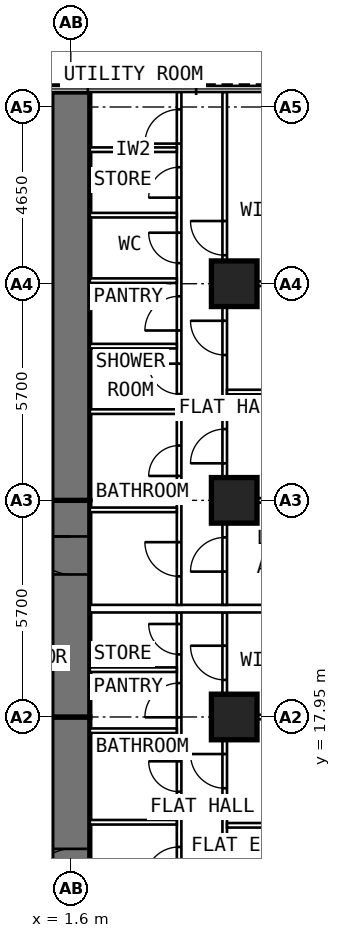
"""IFC4 building model, lengths in metres.
Left out: names, types, materials, properties, quantities, classifications, styles, units other than length and angle.
Written with IfcOpenShell. Run it as: python <this file> out.ifc"""

import sys

from ifc_helpers import new_model, si_unit, direction, frame, frame_2d, origin, origin_2d, place, context, subcontext, project, spatial, rectangle, extrude, element, fill, save


model = new_model("IFC4")
c1 = context("Model", 3, precision=1e-05, world=origin(), true_north=direction((0.0, 1.0)))
c2 = subcontext(c1, "Body", "Model", "MODEL_VIEW")
j1 = project(units=[si_unit("LENGTHUNIT", "METRE"), si_unit("PLANEANGLEUNIT", "RADIAN")], contexts=[c1])
p1 = place(None, origin())
s1 = spatial("IfcSite", under=j1, at=p1, CompositionType="ELEMENT")
p2 = place(p1, origin())
s2 = spatial("IfcBuilding", under=s1, at=p2, CompositionType="ELEMENT")
p3 = place(p2, frame((0.0, 0.0, 84.4)))
s3 = spatial("IfcBuildingStorey", under=s2, at=p3, CompositionType="ELEMENT", Elevation=84.4)
for number, where, z_axis, x_axis in (
    (1, (5.9, 17.95, 0.0), (0.0, 0.0, 1.0), (0.0, 1.0, 0.0)),
    (2, (5.9, 23.65, 0.0), (0.0, 0.0, 1.0), (0.0, 1.0, 0.0)),
    (3, (5.9, 29.35, 0.0), (0.0, 0.0, 1.0), (0.0, 1.0, 0.0)),
):
    element("IfcColumn", number, at=place(p3, frame(where, z_axis=z_axis, x_axis=x_axis)), inside=s3, PredefinedType="COLUMN", context=c2, shape_type="SweptSolid", body=[
        extrude(rectangle(XDim=1.2, YDim=1.2, at=origin_2d()), origin(), (0.0, 0.0, 1.0), 3.6),
    ])
p4 = place(p3, frame((1.6, 9.6, 0.0), z_axis=(0.0, 0.0, 1.0), x_axis=(0.0, 1.0, 0.0)))
e4 = element("IfcWall", 4, at=p4, inside=s3, PredefinedType="SHEAR", context=c2, shape_type="SweptSolid", body=[
    extrude(rectangle(XDim=8.35, YDim=1.0, at=frame_2d((4.175, 0.0))), origin(), (0.0, 0.0, 1.0), 3.6),
])
p5 = place(p4, frame((3.88, 0.0, 0.0)))
e5 = element("IfcOpeningElement", 5, at=p5, cuts=e4, PredefinedType="OPENING", context=c2, shape_type="SweptSolid", body=[
    extrude(rectangle(XDim=1.0, YDim=2.1, at=frame_2d((0.5, 1.05))), frame((0.0, 0.512, 0.0), z_axis=(0.0, -1.0, 0.0), x_axis=(1.0, 0.0, 0.0)), (0.0, 0.0, 1.0), 1.024),
])
p6 = place(p3, frame((1.6, 17.95, 0.0), z_axis=(0.0, 0.0, 1.0), x_axis=(0.0, 1.0, 0.0)))
e6 = element("IfcWall", 6, at=p6, inside=s3, PredefinedType="SHEAR", context=c2, shape_type="SweptSolid", body=[
    extrude(rectangle(XDim=5.7, YDim=1.0, at=frame_2d((2.85, 0.0))), origin(), (0.0, 0.0, 1.0), 3.6),
])
p7 = place(p6, frame((3.75, 0.0, 0.0)))
e7 = element("IfcOpeningElement", 7, at=p7, cuts=e6, PredefinedType="OPENING", context=c2, shape_type="SweptSolid", body=[
    extrude(rectangle(XDim=1.0, YDim=2.1, at=frame_2d((0.5, 1.05))), frame((0.0, 0.512, 0.0), z_axis=(0.0, -1.0, 0.0), x_axis=(1.0, 0.0, 0.0)), (0.0, 0.0, 1.0), 1.024),
])
p8 = place(p3, frame((1.6, 23.65, 0.0), z_axis=(0.0, 0.0, 1.0), x_axis=(0.0, 1.0, 0.0)))
e8 = element("IfcWall", 8, at=p8, inside=s3, PredefinedType="SHEAR", context=c2, shape_type="SweptSolid", body=[
    extrude(rectangle(XDim=10.745, YDim=1.0, at=frame_2d((5.373, 0.0))), origin(), (0.0, 0.0, 1.0), 3.6),
])
p9 = place(p3, frame((4.45, 10.1, 0.0), z_axis=(0.0, 0.0, 1.0), x_axis=(0.0, 1.0, 0.0)))
e9 = element("IfcWall", 9, at=p9, inside=s3, PredefinedType="PARTITIONING", context=c2, shape_type="SweptSolid", body=[
    extrude(rectangle(XDim=10.6, YDim=0.12, at=frame_2d((5.3, 0.0))), origin(), (0.0, 0.0, 1.0), 3.35),
])
p10 = place(p9, frame((1.59, 0.0, 0.0)))
e10 = element("IfcOpeningElement", 10, at=p10, cuts=e9, PredefinedType="OPENING", context=c2, shape_type="SweptSolid", body=[
    extrude(rectangle(XDim=0.8, YDim=2.1, at=frame_2d((0.4, 1.05))), frame((0.0, 0.072, 0.0), z_axis=(0.0, -1.0, 0.0), x_axis=(1.0, 0.0, 0.0)), (0.0, 0.0, 1.0), 0.144),
])
p11 = place(p9, frame((3.53, 0.0, 0.0)))
e11 = element("IfcOpeningElement", 11, at=p11, cuts=e9, PredefinedType="OPENING", context=c2, shape_type="SweptSolid", body=[
    extrude(rectangle(XDim=0.9, YDim=2.1, at=frame_2d((0.45, 1.05))), frame((0.0, 0.072, 0.0), z_axis=(0.0, -1.0, 0.0), x_axis=(1.0, 0.0, 0.0)), (0.0, 0.0, 1.0), 0.144),
])
p12 = place(p9, frame((5.884, 0.0, 0.0)))
e12 = element("IfcOpeningElement", 12, at=p12, cuts=e9, PredefinedType="OPENING", context=c2, shape_type="SweptSolid", body=[
    extrude(rectangle(XDim=0.8, YDim=2.1, at=frame_2d((0.4, 1.05))), frame((0.0, 0.072, 0.0), z_axis=(0.0, -1.0, 0.0), x_axis=(1.0, 0.0, 0.0)), (0.0, 0.0, 1.0), 0.144),
])
p13 = place(p9, frame((7.842, 0.0, 0.0)))
e13 = element("IfcOpeningElement", 13, at=p13, cuts=e9, PredefinedType="OPENING", context=c2, shape_type="SweptSolid", body=[
    extrude(rectangle(XDim=0.9, YDim=2.1, at=frame_2d((0.45, 1.05))), frame((0.0, 0.072, 0.0), z_axis=(0.0, -1.0, 0.0), x_axis=(1.0, 0.0, 0.0)), (0.0, 0.0, 1.0), 0.144),
])
p14 = place(p9, frame((9.497, 0.0, 0.0)))
e14 = element("IfcOpeningElement", 14, at=p14, cuts=e9, PredefinedType="OPENING", context=c2, shape_type="SweptSolid", body=[
    extrude(rectangle(XDim=0.8, YDim=2.1, at=frame_2d((0.4, 1.05))), frame((0.0, 0.072, 0.0), z_axis=(0.0, -1.0, 0.0), x_axis=(1.0, 0.0, 0.0)), (0.0, 0.0, 1.0), 0.144),
])
p15 = place(p3, frame((5.65, 9.6, 0.0), z_axis=(0.0, 0.0, 1.0), x_axis=(0.0, 1.0, 0.0)))
e15 = element("IfcWall", 15, at=p15, inside=s3, PredefinedType="PARTITIONING", context=c2, shape_type="SweptSolid", body=[
    extrude(rectangle(XDim=11.1, YDim=0.12, at=frame_2d((5.55, 0.0))), origin(), (0.0, 0.0, 1.0), 3.35),
])
p16 = place(p15, frame((1.0, 0.0, 0.0)))
e16 = element("IfcOpeningElement", 16, at=p16, cuts=e15, PredefinedType="OPENING", context=c2, shape_type="SweptSolid", body=[
    extrude(rectangle(XDim=0.9, YDim=2.1, at=frame_2d((0.45, 1.05))), frame((0.0, 0.072, 0.0), z_axis=(0.0, -1.0, 0.0), x_axis=(1.0, 0.0, 0.0)), (0.0, 0.0, 1.0), 0.144),
])
p17 = place(p15, frame((3.625, 0.0, 0.0)))
e17 = element("IfcOpeningElement", 17, at=p17, cuts=e15, PredefinedType="OPENING", context=c2, shape_type="SweptSolid", body=[
    extrude(rectangle(XDim=0.9, YDim=2.1, at=frame_2d((0.45, 1.05))), frame((0.0, 0.072, 0.0), z_axis=(0.0, -1.0, 0.0), x_axis=(1.0, 0.0, 0.0)), (0.0, 0.0, 1.0), 0.144),
])
p18 = place(p15, frame((6.475, 0.0, 0.0)))
e18 = element("IfcOpeningElement", 18, at=p18, cuts=e15, PredefinedType="OPENING", context=c2, shape_type="SweptSolid", body=[
    extrude(rectangle(XDim=0.9, YDim=2.1, at=frame_2d((0.45, 1.05))), frame((0.0, 0.072, 0.0), z_axis=(0.0, -1.0, 0.0), x_axis=(1.0, 0.0, 0.0)), (0.0, 0.0, 1.0), 0.144),
])
p19 = place(p15, frame((9.325, 0.0, 0.0)))
e19 = element("IfcOpeningElement", 19, at=p19, cuts=e15, PredefinedType="OPENING", context=c2, shape_type="SweptSolid", body=[
    extrude(rectangle(XDim=0.9, YDim=2.1, at=frame_2d((0.45, 1.05))), frame((0.0, 0.072, 0.0), z_axis=(0.0, -1.0, 0.0), x_axis=(1.0, 0.0, 0.0)), (0.0, 0.0, 1.0), 0.144),
])
p20 = place(p3, frame((5.71, 15.1, 0.0), z_axis=(0.0, 0.0, 1.0), x_axis=(1.0, 0.0, 0.0)))
e20 = element("IfcWall", 20, at=p20, inside=s3, PredefinedType="PARTITIONING", context=c2, shape_type="SweptSolid", body=[
    extrude(rectangle(XDim=4.99, YDim=0.12, at=frame_2d((2.495, 0.0))), origin(), (0.0, 0.0, 1.0), 3.35),
])
p21 = place(p3, frame((5.71, 17.95, 0.0), z_axis=(0.0, 0.0, 1.0), x_axis=(1.0, 0.0, 0.0)))
e21 = element("IfcWall", 21, at=p21, inside=s3, PredefinedType="PARTITIONING", context=c2, shape_type="SweptSolid", body=[
    extrude(rectangle(XDim=4.99, YDim=0.12, at=frame_2d((2.495, 0.0))), origin(), (0.0, 0.0, 1.0), 2.45),
])
p22 = place(p3, frame((2.1, 15.18, 0.0), z_axis=(0.0, 0.0, 1.0), x_axis=(1.0, 0.0, 0.0)))
e22 = element("IfcWall", 22, at=p22, inside=s3, PredefinedType="PARTITIONING", context=c2, shape_type="SweptSolid", body=[
    extrude(rectangle(XDim=2.29, YDim=0.12, at=frame_2d((1.145, 0.0))), origin(), (0.0, 0.0, 1.0), 3.35),
])
p23 = place(p3, frame((2.1, 17.589, 0.0), z_axis=(0.0, 0.0, 1.0), x_axis=(1.0, 0.0, 0.0)))
e23 = element("IfcWall", 23, at=p23, inside=s3, PredefinedType="PARTITIONING", context=c2, shape_type="SweptSolid", body=[
    extrude(rectangle(XDim=2.29, YDim=0.12, at=frame_2d((1.145, 0.0))), origin(), (0.0, 0.0, 1.0), 2.45),
])
p24 = place(p3, frame((2.1, 19.194, 0.0), z_axis=(0.0, 0.0, 1.0), x_axis=(1.0, 0.0, 0.0)))
e24 = element("IfcWall", 24, at=p24, inside=s3, PredefinedType="PARTITIONING", context=c2, shape_type="SweptSolid", body=[
    extrude(rectangle(XDim=2.29, YDim=0.12, at=frame_2d((1.145, 0.0))), origin(), (0.0, 0.0, 1.0), 3.35),
])
p25 = place(p3, frame((4.45, 20.9, 0.0), z_axis=(0.0, 0.0, 1.0), x_axis=(0.0, 1.0, 0.0)))
e25 = element("IfcWall", 25, at=p25, inside=s3, PredefinedType="PARTITIONING", context=c2, shape_type="SweptSolid", body=[
    extrude(rectangle(XDim=13.495, YDim=0.12, at=frame_2d((6.748, 0.0))), origin(), (0.0, 0.0, 1.0), 3.35),
])
p26 = place(p25, frame((0.75, 0.0, 0.0)))
e26 = element("IfcOpeningElement", 26, at=p26, cuts=e25, PredefinedType="OPENING", context=c2, shape_type="SweptSolid", body=[
    extrude(rectangle(XDim=0.9, YDim=2.1, at=frame_2d((0.45, 1.05))), frame((0.0, 0.072, 0.0), z_axis=(0.0, -1.0, 0.0), x_axis=(1.0, 0.0, 0.0)), (0.0, 0.0, 1.0), 0.144),
])
p27 = place(p25, frame((3.392, 0.0, 0.0)))
e27 = element("IfcOpeningElement", 27, at=p27, cuts=e25, PredefinedType="OPENING", context=c2, shape_type="SweptSolid", body=[
    extrude(rectangle(XDim=0.8, YDim=2.1, at=frame_2d((0.4, 1.05))), frame((0.0, 0.072, 0.0), z_axis=(0.0, -1.0, 0.0), x_axis=(1.0, 0.0, 0.0)), (0.0, 0.0, 1.0), 0.144),
])
p28 = place(p25, frame((5.546, 0.0, 0.0)))
e28 = element("IfcOpeningElement", 28, at=p28, cuts=e25, PredefinedType="OPENING", context=c2, shape_type="SweptSolid", body=[
    extrude(rectangle(XDim=0.8, YDim=2.1, at=frame_2d((0.4, 1.05))), frame((0.0, 0.072, 0.0), z_axis=(0.0, -1.0, 0.0), x_axis=(1.0, 0.0, 0.0)), (0.0, 0.0, 1.0), 0.144),
])
p29 = place(p25, frame((7.219, 0.0, 0.0)))
e29 = element("IfcOpeningElement", 29, at=p29, cuts=e25, PredefinedType="OPENING", context=c2, shape_type="SweptSolid", body=[
    extrude(rectangle(XDim=0.9, YDim=2.1, at=frame_2d((0.45, 1.05))), frame((0.0, 0.072, 0.0), z_axis=(0.0, -1.0, 0.0), x_axis=(1.0, 0.0, 0.0)), (0.0, 0.0, 1.0), 0.144),
])
p30 = place(p25, frame((8.992, 0.0, 0.0)))
e30 = element("IfcOpeningElement", 30, at=p30, cuts=e25, PredefinedType="OPENING", context=c2, shape_type="SweptSolid", body=[
    extrude(rectangle(XDim=0.8, YDim=2.1, at=frame_2d((0.4, 1.05))), frame((0.0, 0.072, 0.0), z_axis=(0.0, -1.0, 0.0), x_axis=(1.0, 0.0, 0.0)), (0.0, 0.0, 1.0), 0.144),
])
p31 = place(p25, frame((10.715, 0.0, 0.0)))
e31 = element("IfcOpeningElement", 31, at=p31, cuts=e25, PredefinedType="OPENING", context=c2, shape_type="SweptSolid", body=[
    extrude(rectangle(XDim=0.8, YDim=2.1, at=frame_2d((0.4, 1.05))), frame((0.0, 0.072, 0.0), z_axis=(0.0, -1.0, 0.0), x_axis=(1.0, 0.0, 0.0)), (0.0, 0.0, 1.0), 0.144),
])
p32 = place(p25, frame((12.137, 0.0, 0.0)))
e32 = element("IfcOpeningElement", 32, at=p32, cuts=e25, PredefinedType="OPENING", context=c2, shape_type="SweptSolid", body=[
    extrude(rectangle(XDim=0.9, YDim=2.1, at=frame_2d((0.45, 1.05))), frame((0.0, 0.072, 0.0), z_axis=(0.0, -1.0, 0.0), x_axis=(1.0, 0.0, 0.0)), (0.0, 0.0, 1.0), 0.144),
])
p33 = place(p3, frame((5.65, 20.9, 0.0), z_axis=(0.0, 0.0, 1.0), x_axis=(0.0, 1.0, 0.0)))
e33 = element("IfcWall", 33, at=p33, inside=s3, PredefinedType="PARTITIONING", context=c2, shape_type="SweptSolid", body=[
    extrude(rectangle(XDim=13.495, YDim=0.12, at=frame_2d((6.748, 0.0))), origin(), (0.0, 0.0, 1.0), 3.35),
])
p34 = place(p33, frame((0.875, 0.0, 0.0)))
e34 = element("IfcOpeningElement", 34, at=p34, cuts=e33, PredefinedType="OPENING", context=c2, shape_type="SweptSolid", body=[
    extrude(rectangle(XDim=0.9, YDim=2.1, at=frame_2d((0.45, 1.05))), frame((0.0, 0.072, 0.0), z_axis=(0.0, -1.0, 0.0), x_axis=(1.0, 0.0, 0.0)), (0.0, 0.0, 1.0), 0.144),
])
p35 = place(p33, frame((3.725, 0.0, 0.0)))
e35 = element("IfcOpeningElement", 35, at=p35, cuts=e33, PredefinedType="OPENING", context=c2, shape_type="SweptSolid", body=[
    extrude(rectangle(XDim=0.9, YDim=2.1, at=frame_2d((0.45, 1.05))), frame((0.0, 0.072, 0.0), z_axis=(0.0, -1.0, 0.0), x_axis=(1.0, 0.0, 0.0)), (0.0, 0.0, 1.0), 0.144),
])
p36 = place(p33, frame((6.575, 0.0, 0.0)))
e36 = element("IfcOpeningElement", 36, at=p36, cuts=e33, PredefinedType="OPENING", context=c2, shape_type="SweptSolid", body=[
    extrude(rectangle(XDim=0.9, YDim=2.1, at=frame_2d((0.45, 1.05))), frame((0.0, 0.072, 0.0), z_axis=(0.0, -1.0, 0.0), x_axis=(1.0, 0.0, 0.0)), (0.0, 0.0, 1.0), 0.144),
])
p37 = place(p33, frame((9.2, 0.0, 0.0)))
e37 = element("IfcOpeningElement", 37, at=p37, cuts=e33, PredefinedType="OPENING", context=c2, shape_type="SweptSolid", body=[
    extrude(rectangle(XDim=0.9, YDim=2.1, at=frame_2d((0.45, 1.05))), frame((0.0, 0.072, 0.0), z_axis=(0.0, -1.0, 0.0), x_axis=(1.0, 0.0, 0.0)), (0.0, 0.0, 1.0), 0.144),
])
p38 = place(p3, frame((5.71, 23.65, 0.0), z_axis=(0.0, 0.0, 1.0), x_axis=(1.0, 0.0, 0.0)))
e38 = element("IfcWall", 38, at=p38, inside=s3, PredefinedType="PARTITIONING", context=c2, shape_type="SweptSolid", body=[
    extrude(rectangle(XDim=4.99, YDim=0.12, at=frame_2d((2.495, 0.0))), origin(), (0.0, 0.0, 1.0), 2.45),
])
p39 = place(p3, frame((5.71, 26.5, 0.0), z_axis=(0.0, 0.0, 1.0), x_axis=(1.0, 0.0, 0.0)))
e39 = element("IfcWall", 39, at=p39, inside=s3, PredefinedType="PARTITIONING", context=c2, shape_type="SweptSolid", body=[
    extrude(rectangle(XDim=4.99, YDim=0.12, at=frame_2d((2.495, 0.0))), origin(), (0.0, 0.0, 1.0), 3.35),
])
p40 = place(p3, frame((5.71, 29.35, 0.0), z_axis=(0.0, 0.0, 1.0), x_axis=(1.0, 0.0, 0.0)))
e40 = element("IfcWall", 40, at=p40, inside=s3, PredefinedType="PARTITIONING", context=c2, shape_type="SweptSolid", body=[
    extrude(rectangle(XDim=4.99, YDim=0.12, at=frame_2d((2.495, 0.0))), origin(), (0.0, 0.0, 1.0), 2.45),
])
p41 = place(p3, frame((2.1, 23.4, 0.0), z_axis=(0.0, 0.0, 1.0), x_axis=(1.0, 0.0, 0.0)))
e41 = element("IfcWall", 41, at=p41, inside=s3, PredefinedType="PARTITIONING", context=c2, shape_type="SweptSolid", body=[
    extrude(rectangle(XDim=2.29, YDim=0.12, at=frame_2d((1.145, 0.0))), origin(), (0.0, 0.0, 1.0), 2.45),
])
for number, where, z_axis, x_axis in (
    (42, (2.1, 25.985, 0.0), (0.0, 0.0, 1.0), (1.0, 0.0, 0.0)),
    (43, (2.1, 27.708, 0.0), (0.0, 0.0, 1.0), (1.0, 0.0, 0.0)),
):
    element("IfcWall", number, at=place(p3, frame(where, z_axis=z_axis, x_axis=x_axis)), inside=s3, PredefinedType="PARTITIONING", context=c2, shape_type="SweptSolid", body=[
        extrude(rectangle(XDim=2.29, YDim=0.12, at=frame_2d((1.145, 0.0))), origin(), (0.0, 0.0, 1.0), 3.35),
    ])
p42 = place(p3, frame((2.1, 29.431, 0.0), z_axis=(0.0, 0.0, 1.0), x_axis=(1.0, 0.0, 0.0)))
e44 = element("IfcWall", 44, at=p42, inside=s3, PredefinedType="PARTITIONING", context=c2, shape_type="SweptSolid", body=[
    extrude(rectangle(XDim=2.29, YDim=0.12, at=frame_2d((1.145, 0.0))), origin(), (0.0, 0.0, 1.0), 2.45),
])
for number, where, z_axis, x_axis in (
    (45, (2.1, 31.154, 0.0), (0.0, 0.0, 1.0), (1.0, 0.0, 0.0)),
    (46, (2.1, 32.877, 0.0), (0.0, 0.0, 1.0), (1.0, 0.0, 0.0)),
):
    element("IfcWall", number, at=place(p3, frame(where, z_axis=z_axis, x_axis=x_axis)), inside=s3, PredefinedType="PARTITIONING", context=c2, shape_type="SweptSolid", body=[
        extrude(rectangle(XDim=2.29, YDim=0.12, at=frame_2d((1.145, 0.0))), origin(), (0.0, 0.0, 1.0), 3.35),
    ])
p43 = place(p3, frame((2.1, 20.8, 0.0), z_axis=(0.0, 0.0, 1.0), x_axis=(1.0, 0.0, 0.0)))
e47 = element("IfcWall", 47, at=p43, inside=s3, PredefinedType="PARTITIONING", context=c2, shape_type="SweptSolid", body=[
    extrude(rectangle(XDim=8.6, YDim=0.2, at=frame_2d((4.3, 0.0))), origin(), (0.0, 0.0, 1.0), 3.35),
])
p44 = place(p5, origin())
e48 = element("IfcDoor", 48, at=p44, inside=s3, OperationType="SINGLE_SWING_LEFT", PredefinedType="DOOR", context=c2, shape_type="SweptSolid", body=[
    extrude(rectangle(XDim=1.0, YDim=2.1, at=frame_2d((0.5, 1.05))), frame((0.0, 0.25, 0.0), z_axis=(0.0, -1.0, 0.0), x_axis=(1.0, 0.0, 0.0)), (0.0, 0.0, 1.0), 0.5),
])
fill(e5, e48)
p45 = place(p18, origin())
e49 = element("IfcDoor", 49, at=p45, inside=s3, OperationType="SINGLE_SWING_RIGHT", PredefinedType="DOOR", context=c2, shape_type="SweptSolid", body=[
    extrude(rectangle(XDim=0.9, YDim=2.1, at=frame_2d((0.45, 1.05))), frame((0.0, 0.025, 0.0), z_axis=(0.0, -1.0, 0.0), x_axis=(1.0, 0.0, 0.0)), (0.0, 0.0, 1.0), 0.05),
])
fill(e18, e49)
p46 = place(p19, origin())
e50 = element("IfcDoor", 50, at=p46, inside=s3, OperationType="SINGLE_SWING_RIGHT", PredefinedType="DOOR", context=c2, shape_type="SweptSolid", body=[
    extrude(rectangle(XDim=0.9, YDim=2.1, at=frame_2d((0.45, 1.05))), frame((0.0, 0.025, 0.0), z_axis=(0.0, -1.0, 0.0), x_axis=(1.0, 0.0, 0.0)), (0.0, 0.0, 1.0), 0.05),
])
fill(e19, e50)
p47 = place(p11, origin())
e51 = element("IfcDoor", 51, at=p47, inside=s3, OperationType="SINGLE_SWING_LEFT", PredefinedType="DOOR", context=c2, shape_type="SweptSolid", body=[
    extrude(rectangle(XDim=0.9, YDim=2.1, at=frame_2d((0.45, 1.05))), frame((0.0, 0.025, 0.0), z_axis=(0.0, -1.0, 0.0), x_axis=(1.0, 0.0, 0.0)), (0.0, 0.0, 1.0), 0.05),
])
fill(e11, e51)
p48 = place(p12, origin())
e52 = element("IfcDoor", 52, at=p48, inside=s3, OperationType="SINGLE_SWING_RIGHT", PredefinedType="DOOR", context=c2, shape_type="SweptSolid", body=[
    extrude(rectangle(XDim=0.8, YDim=2.1, at=frame_2d((0.4, 1.05))), frame((0.0, 0.025, 0.0), z_axis=(0.0, -1.0, 0.0), x_axis=(1.0, 0.0, 0.0)), (0.0, 0.0, 1.0), 0.05),
])
fill(e12, e52)
p49 = place(p13, origin())
e53 = element("IfcDoor", 53, at=p49, inside=s3, OperationType="SINGLE_SWING_LEFT", PredefinedType="DOOR", context=c2, shape_type="SweptSolid", body=[
    extrude(rectangle(XDim=0.9, YDim=2.1, at=frame_2d((0.45, 1.05))), frame((0.0, 0.025, 0.0), z_axis=(0.0, -1.0, 0.0), x_axis=(1.0, 0.0, 0.0)), (0.0, 0.0, 1.0), 0.05),
])
fill(e13, e53)
p50 = place(p14, origin())
e54 = element("IfcDoor", 54, at=p50, inside=s3, OperationType="SINGLE_SWING_RIGHT", PredefinedType="DOOR", context=c2, shape_type="SweptSolid", body=[
    extrude(rectangle(XDim=0.8, YDim=2.1, at=frame_2d((0.4, 1.05))), frame((0.0, 0.025, 0.0), z_axis=(0.0, -1.0, 0.0), x_axis=(1.0, 0.0, 0.0)), (0.0, 0.0, 1.0), 0.05),
])
fill(e14, e54)
p51 = place(p7, origin())
e55 = element("IfcDoor", 55, at=p51, inside=s3, OperationType="SINGLE_SWING_RIGHT", PredefinedType="DOOR", context=c2, shape_type="SweptSolid", body=[
    extrude(rectangle(XDim=1.0, YDim=2.1, at=frame_2d((0.5, 1.05))), frame((0.0, 0.25, 0.0), z_axis=(0.0, -1.0, 0.0), x_axis=(1.0, 0.0, 0.0)), (0.0, 0.0, 1.0), 0.5),
])
fill(e7, e55)
p52 = place(p34, origin())
e56 = element("IfcDoor", 56, at=p52, inside=s3, OperationType="SINGLE_SWING_LEFT", PredefinedType="DOOR", context=c2, shape_type="SweptSolid", body=[
    extrude(rectangle(XDim=0.9, YDim=2.1, at=frame_2d((0.45, 1.05))), frame((0.0, 0.025, 0.0), z_axis=(0.0, -1.0, 0.0), x_axis=(1.0, 0.0, 0.0)), (0.0, 0.0, 1.0), 0.05),
])
fill(e34, e56)
p53 = place(p35, origin())
e57 = element("IfcDoor", 57, at=p53, inside=s3, OperationType="SINGLE_SWING_LEFT", PredefinedType="DOOR", context=c2, shape_type="SweptSolid", body=[
    extrude(rectangle(XDim=0.9, YDim=2.1, at=frame_2d((0.45, 1.05))), frame((0.0, 0.025, 0.0), z_axis=(0.0, -1.0, 0.0), x_axis=(1.0, 0.0, 0.0)), (0.0, 0.0, 1.0), 0.05),
])
fill(e35, e57)
p54 = place(p36, origin())
e58 = element("IfcDoor", 58, at=p54, inside=s3, OperationType="SINGLE_SWING_RIGHT", PredefinedType="DOOR", context=c2, shape_type="SweptSolid", body=[
    extrude(rectangle(XDim=0.9, YDim=2.1, at=frame_2d((0.45, 1.05))), frame((0.0, 0.025, 0.0), z_axis=(0.0, -1.0, 0.0), x_axis=(1.0, 0.0, 0.0)), (0.0, 0.0, 1.0), 0.05),
])
fill(e36, e58)
p55 = place(p37, origin())
e59 = element("IfcDoor", 59, at=p55, inside=s3, OperationType="SINGLE_SWING_RIGHT", PredefinedType="DOOR", context=c2, shape_type="SweptSolid", body=[
    extrude(rectangle(XDim=0.9, YDim=2.1, at=frame_2d((0.45, 1.05))), frame((0.0, 0.025, 0.0), z_axis=(0.0, -1.0, 0.0), x_axis=(1.0, 0.0, 0.0)), (0.0, 0.0, 1.0), 0.05),
])
fill(e37, e59)
p56 = place(p26, origin())
e60 = element("IfcDoor", 60, at=p56, inside=s3, OperationType="SINGLE_SWING_RIGHT", PredefinedType="DOOR", context=c2, shape_type="SweptSolid", body=[
    extrude(rectangle(XDim=0.9, YDim=2.1, at=frame_2d((0.45, 1.05))), frame((0.0, 0.025, 0.0), z_axis=(0.0, -1.0, 0.0), x_axis=(1.0, 0.0, 0.0)), (0.0, 0.0, 1.0), 0.05),
])
fill(e26, e60)
p57 = place(p27, origin())
e61 = element("IfcDoor", 61, at=p57, inside=s3, OperationType="SINGLE_SWING_LEFT", PredefinedType="DOOR", context=c2, shape_type="SweptSolid", body=[
    extrude(rectangle(XDim=0.8, YDim=2.1, at=frame_2d((0.4, 1.05))), frame((0.0, 0.025, 0.0), z_axis=(0.0, -1.0, 0.0), x_axis=(1.0, 0.0, 0.0)), (0.0, 0.0, 1.0), 0.05),
])
fill(e27, e61)
p58 = place(p28, origin())
e62 = element("IfcDoor", 62, at=p58, inside=s3, OperationType="SINGLE_SWING_RIGHT", PredefinedType="DOOR", context=c2, shape_type="SweptSolid", body=[
    extrude(rectangle(XDim=0.8, YDim=2.1, at=frame_2d((0.4, 1.05))), frame((0.0, 0.025, 0.0), z_axis=(0.0, -1.0, 0.0), x_axis=(1.0, 0.0, 0.0)), (0.0, 0.0, 1.0), 0.05),
])
fill(e28, e62)
p59 = place(p29, origin())
e63 = element("IfcDoor", 63, at=p59, inside=s3, OperationType="SINGLE_SWING_LEFT", PredefinedType="DOOR", context=c2, shape_type="SweptSolid", body=[
    extrude(rectangle(XDim=0.9, YDim=2.1, at=frame_2d((0.45, 1.05))), frame((0.0, 0.025, 0.0), z_axis=(0.0, -1.0, 0.0), x_axis=(1.0, 0.0, 0.0)), (0.0, 0.0, 1.0), 0.05),
])
fill(e29, e63)
p60 = place(p30, origin())
e64 = element("IfcDoor", 64, at=p60, inside=s3, OperationType="SINGLE_SWING_RIGHT", PredefinedType="DOOR", context=c2, shape_type="SweptSolid", body=[
    extrude(rectangle(XDim=0.8, YDim=2.1, at=frame_2d((0.4, 1.05))), frame((0.0, 0.025, 0.0), z_axis=(0.0, -1.0, 0.0), x_axis=(1.0, 0.0, 0.0)), (0.0, 0.0, 1.0), 0.05),
])
fill(e30, e64)
p61 = place(p31, origin())
e65 = element("IfcDoor", 65, at=p61, inside=s3, OperationType="SINGLE_SWING_LEFT", PredefinedType="DOOR", context=c2, shape_type="SweptSolid", body=[
    extrude(rectangle(XDim=0.8, YDim=2.1, at=frame_2d((0.4, 1.05))), frame((0.0, 0.025, 0.0), z_axis=(0.0, -1.0, 0.0), x_axis=(1.0, 0.0, 0.0)), (0.0, 0.0, 1.0), 0.05),
])
fill(e31, e65)
p62 = place(p32, origin())
e66 = element("IfcDoor", 66, at=p62, inside=s3, OperationType="SINGLE_SWING_LEFT", PredefinedType="DOOR", context=c2, shape_type="SweptSolid", body=[
    extrude(rectangle(XDim=0.9, YDim=2.1, at=frame_2d((0.45, 1.05))), frame((0.0, 0.025, 0.0), z_axis=(0.0, -1.0, 0.0), x_axis=(1.0, 0.0, 0.0)), (0.0, 0.0, 1.0), 0.05),
])
fill(e32, e66)
save(model, sys.argv[1])
